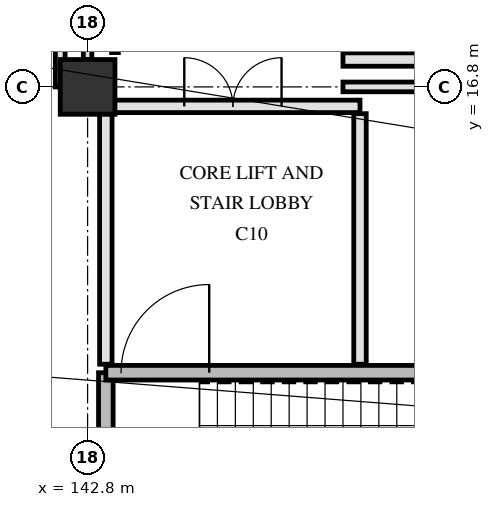
"""IFC4 building model, lengths in metres.
Left out: names, types, materials, properties, quantities, classifications, styles, units other than length and angle.
Written with IfcOpenShell. Run it as: python <this file> out.ifc"""

import sys

from ifc_helpers import new_model, si_unit, direction, frame, frame_2d, origin, origin_2d, place, context, subcontext, project, spatial, rectangle, extrude, element, fill, save


model = new_model("IFC4")
c1 = context("Model", 3, precision=1e-05, world=origin(), true_north=direction((0.0, 1.0)))
c2 = subcontext(c1, "Body", "Model", "MODEL_VIEW")
j1 = project(units=[si_unit("LENGTHUNIT", "METRE"), si_unit("PLANEANGLEUNIT", "RADIAN")], contexts=[c1])
p1 = place(None, origin())
s1 = spatial("IfcSite", under=j1, at=p1, CompositionType="ELEMENT")
p2 = place(p1, origin())
s2 = spatial("IfcBuilding", under=s1, at=p2, CompositionType="ELEMENT")
p3 = place(p2, frame((0.0, 0.0, -5.4)))
s3 = spatial("IfcBuildingStorey", under=s2, at=p3, CompositionType="ELEMENT", Elevation=-5.4)
p4 = place(p3, frame((142.8, 16.8, 0.0), z_axis=(0.0, 0.0, 1.0), x_axis=(1.0, 0.0, 0.0)))
e1 = element("IfcColumn", 1, at=p4, inside=s3, PredefinedType="COLUMN", context=c2, shape_type="SweptSolid", body=[
    extrude(rectangle(XDim=0.9, YDim=0.9, at=origin_2d()), origin(), (0.0, 0.0, 1.0), 5.4),
])
p5 = place(p3, frame((143.1, 8.78, 0.0), z_axis=(0.0, 0.0, 1.0), x_axis=(0.0, 1.0, 0.0)))
e2 = element("IfcWall", 2, at=p5, inside=s3, PredefinedType="SHEAR", context=c2, shape_type="SweptSolid", body=[
    extrude(rectangle(XDim=3.32, YDim=0.24, at=frame_2d((1.66, 0.0))), origin(), (0.0, 0.0, 1.0), 5.08),
])
p6 = place(p3, frame((143.1, 12.1, 0.0), z_axis=(0.0, 0.0, 1.0), x_axis=(1.0, 0.0, 0.0)))
e3 = element("IfcWall", 3, at=p6, inside=s3, PredefinedType="SHEAR", context=c2, shape_type="SweptSolid", body=[
    extrude(rectangle(XDim=7.82, YDim=0.24, at=frame_2d((3.91, 0.0))), origin(), (0.0, 0.0, 1.0), 5.08),
])
p7 = place(p6, frame((0.25, 0.0, 0.0)))
e4 = element("IfcOpeningElement", 4, at=p7, cuts=e3, PredefinedType="OPENING", context=c2, shape_type="SweptSolid", body=[
    extrude(rectangle(XDim=1.45, YDim=2.2, at=frame_2d((0.725, 1.1))), frame((0.0, 0.13, 0.0), z_axis=(0.0, -1.0, 0.0), x_axis=(1.0, 0.0, 0.0)), (0.0, 0.0, 1.0), 0.26),
])
p8 = place(p3, frame((147.28, 12.24, 0.0), z_axis=(0.0, 0.0, 1.0), x_axis=(0.0, 1.0, 0.0)))
e5 = element("IfcWall", 5, at=p8, inside=s3, PredefinedType="PARTITIONING", context=c2, shape_type="SweptSolid", body=[
    extrude(rectangle(XDim=4.12, YDim=0.205, at=frame_2d((2.06, 0.0))), origin(), (0.0, 0.0, 1.0), 5.07),
])
p9 = place(p3, frame((143.1, 12.24, 0.0), z_axis=(0.0, 0.0, 1.0), x_axis=(0.0, 1.0, 0.0)))
e6 = element("IfcWall", 6, at=p9, inside=s3, PredefinedType="PARTITIONING", context=c2, shape_type="SweptSolid", body=[
    extrude(rectangle(XDim=4.12, YDim=0.205, at=frame_2d((2.06, 0.0))), origin(), (0.0, 0.0, 1.0), 4.47),
])
p10 = place(p3, frame((143.1, 16.48, 0.0), z_axis=(0.0, 0.0, 1.0), x_axis=(1.0, 0.0, 0.0)))
e7 = element("IfcWall", 7, at=p10, inside=s3, PredefinedType="PARTITIONING", context=c2, shape_type="SweptSolid", body=[
    extrude(rectangle(XDim=4.18, YDim=0.205, at=frame_2d((2.09, 0.0))), origin(), (0.0, 0.0, 1.0), 4.42),
])
p11 = place(p10, frame((1.29, 0.0, 0.0)))
e8 = element("IfcOpeningElement", 8, at=p11, cuts=e7, PredefinedType="OPENING", context=c2, shape_type="SweptSolid", body=[
    extrude(rectangle(XDim=1.6, YDim=2.25, at=frame_2d((0.8, 1.125))), frame((0.0, 0.113, 0.0), z_axis=(0.0, -1.0, 0.0), x_axis=(1.0, 0.0, 0.0)), (0.0, 0.0, 1.0), 0.225),
])
p12 = place(p3, frame((147.0, 16.8, 0.0), z_axis=(0.0, 0.0, 1.0), x_axis=(1.0, 0.0, 0.0)))
e9 = element("IfcWall", 9, at=p12, inside=s3, PredefinedType="PARTITIONING", context=c2, shape_type="SweptSolid", body=[
    extrude(rectangle(XDim=3.805, YDim=0.16, at=frame_2d((1.902, 0.0))), origin(), (0.0, 0.0, 1.0), 4.42),
])
p13 = place(p3, frame((147.0, 17.25, 0.0), z_axis=(0.0, 0.0, 1.0), x_axis=(1.0, 0.0, 0.0)))
e10 = element("IfcWall", 10, at=p13, inside=s3, PredefinedType="PARTITIONING", context=c2, shape_type="SweptSolid", body=[
    extrude(rectangle(XDim=3.75, YDim=0.22, at=frame_2d((1.875, 0.0))), origin(), (0.0, 0.0, 1.0), 5.07),
])
p14 = place(p3, frame((142.35, 16.8, 0.0), z_axis=(0.0, 0.0, 1.0), x_axis=(0.0, 1.0, 0.0)))
e11 = element("IfcWall", 11, at=p14, inside=s3, PredefinedType="PARTITIONING", context=c2, shape_type="SweptSolid", body=[
    extrude(rectangle(XDim=2.335, YDim=0.16, at=frame_2d((1.167, 0.0))), origin(), (0.0, 0.0, 1.0), 4.42),
])
p15 = place(p3, frame((142.8, 17.245, 0.0), z_axis=(0.0, 0.0, 1.0), x_axis=(0.0, 1.0, 0.0)))
e12 = element("IfcWall", 12, at=p15, inside=s3, PredefinedType="PARTITIONING", context=c2, shape_type="SweptSolid", body=[
    extrude(rectangle(XDim=5.24, YDim=0.14, at=frame_2d((2.62, 0.0))), origin(), (0.0, 0.0, 1.0), 4.47),
])
p16 = place(p3, frame((143.25, 17.365, 0.0), z_axis=(0.0, 0.0, 1.0), x_axis=(0.0, 1.0, 0.0)))
e13 = element("IfcWall", 13, at=p16, inside=s3, PredefinedType="PARTITIONING", context=c2, shape_type="SweptSolid", body=[
    extrude(rectangle(XDim=1.77, YDim=0.112, at=frame_2d((0.885, 0.0))), origin(), (0.0, 0.0, 1.0), 5.07),
])
p17 = place(p7, origin())
e14 = element("IfcDoor", 14, at=p17, inside=s3, OperationType="SINGLE_SWING_RIGHT", PredefinedType="DOOR", context=c2, shape_type="SweptSolid", body=[
    extrude(rectangle(XDim=1.45, YDim=2.2, at=frame_2d((0.725, 1.1))), frame((0.0, 0.025, 0.0), z_axis=(0.0, -1.0, 0.0), x_axis=(1.0, 0.0, 0.0)), (0.0, 0.0, 1.0), 0.05),
])
fill(e4, e14)
p18 = place(p11, origin())
e15 = element("IfcDoor", 15, at=p18, inside=s3, OperationType="DOUBLE_SWING_LEFT", PredefinedType="DOOR", context=c2, shape_type="SweptSolid", body=[
    extrude(rectangle(XDim=1.6, YDim=2.25, at=frame_2d((0.8, 1.125))), frame((0.0, 0.025, 0.0), z_axis=(0.0, -1.0, 0.0), x_axis=(1.0, 0.0, 0.0)), (0.0, 0.0, 1.0), 0.05),
])
fill(e8, e15)
save(model, sys.argv[1])
